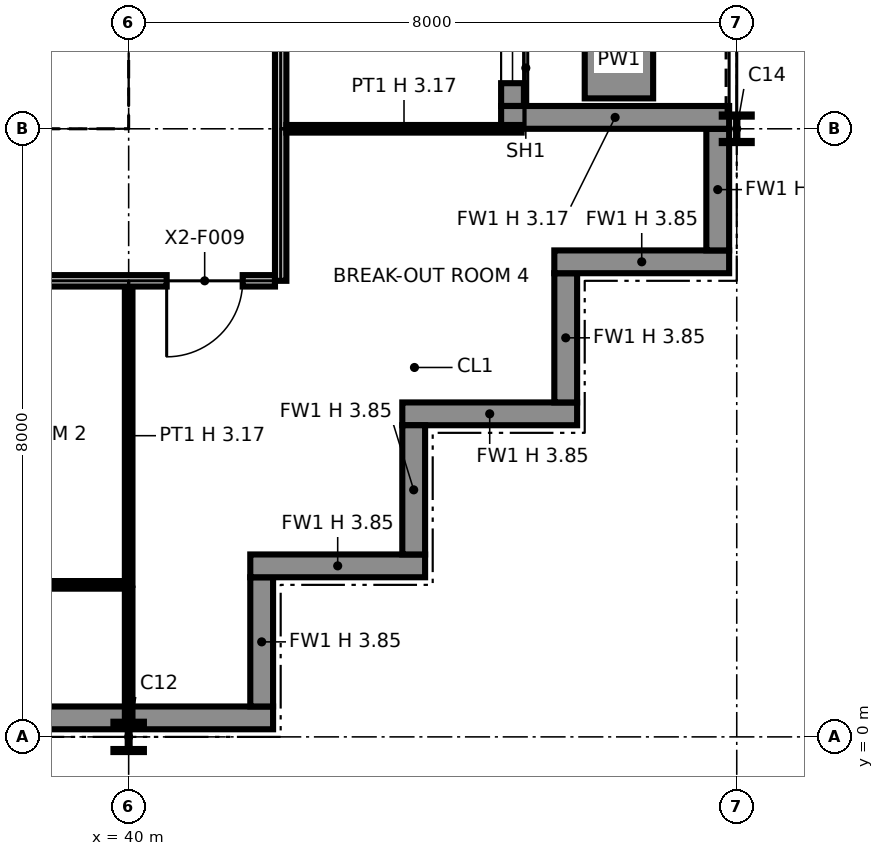
"""IFC4 building model, lengths in metres.
Left out: names, types, materials, properties, quantities, classifications, styles, units other than length and angle.
Written with IfcOpenShell. Run it as: python <this file> out.ifc"""

import sys

from ifc_helpers import new_model, si_unit, direction, frame, frame_2d, origin, origin_2d, place, context, subcontext, project, spatial, polyline, rectangle, i_section, outline, extrude, element, fill, save


model = new_model("IFC4")
c1 = context("Model", 3, precision=1e-05, world=origin(), true_north=direction((0.0, 1.0)))
c2 = subcontext(c1, "Body", "Model", "MODEL_VIEW")
j1 = project(units=[si_unit("LENGTHUNIT", "METRE"), si_unit("PLANEANGLEUNIT", "RADIAN")], contexts=[c1])
p1 = place(None, origin())
s1 = spatial("IfcSite", under=j1, at=p1, CompositionType="ELEMENT")
p2 = place(p1, origin())
s2 = spatial("IfcBuilding", under=s1, at=p2, CompositionType="ELEMENT")
p3 = place(p2, frame((0.0, 0.0, 259.0)))
s3 = spatial("IfcBuildingStorey", under=s2, at=p3, CompositionType="ELEMENT", Elevation=259.0)
p4 = place(p3, frame((40.0, 0.0, 0.0), z_axis=(0.0, 0.0, 1.0), x_axis=(1.0, 0.0, 0.0)))
e1 = element("IfcColumn", 1, at=p4, inside=s3, PredefinedType="COLUMN", context=c2, shape_type="SweptSolid", body=[
    extrude(i_section(OverallWidth=0.401, OverallDepth=0.399, WebThickness=0.025, FlangeThickness=0.04, at=origin_2d()), origin(), (0.0, 0.0, 1.0), 3.85),
])
p5 = place(p3, frame((40.0, 8.0, 0.0), z_axis=(0.0, 0.0, 1.0), x_axis=(1.0, 0.0, 0.0)))
e2 = element("IfcColumn", 2, at=p5, inside=s3, PredefinedType="COLUMN", context=c2, shape_type="SweptSolid", body=[
    extrude(i_section(OverallWidth=0.371, OverallDepth=0.361, WebThickness=0.012, FlangeThickness=0.02, at=origin_2d()), origin(), (0.0, 0.0, 1.0), 3.85),
])
p6 = place(p3, frame((48.0, 8.0, 0.0), z_axis=(0.0, 0.0, 1.0), x_axis=(1.0, 0.0, 0.0)))
e3 = element("IfcColumn", 3, at=p6, inside=s3, PredefinedType="COLUMN", context=c2, shape_type="SweptSolid", body=[
    extrude(i_section(OverallWidth=0.394, OverallDepth=0.376, WebThickness=0.017, FlangeThickness=0.028, at=origin_2d()), origin(), (0.0, 0.0, 1.0), 3.85),
])
p7 = place(p3, frame((32.0, 0.25, 0.0), z_axis=(0.0, 0.0, 1.0), x_axis=(1.0, 0.0, 0.0)))
e4 = element("IfcWall", 4, at=p7, inside=s3, PredefinedType="SOLIDWALL", context=c2, shape_type="SweptSolid", body=[
    extrude(rectangle(XDim=9.9, YDim=0.3, at=frame_2d((4.95, 0.0))), origin(), (0.0, 0.0, 1.0), 3.85),
])
p8 = place(p3, frame((41.75, 0.4, 0.0), z_axis=(0.0, 0.0, 1.0), x_axis=(0.0, 1.0, 0.0)))
e5 = element("IfcWall", 5, at=p8, inside=s3, PredefinedType="SOLIDWALL", context=c2, shape_type="SweptSolid", body=[
    extrude(rectangle(XDim=1.7, YDim=0.3, at=frame_2d((0.85, 0.0))), origin(), (0.0, 0.0, 1.0), 3.85),
])
p9 = place(p3, frame((41.6, 2.25, 0.0), z_axis=(0.0, 0.0, 1.0), x_axis=(1.0, 0.0, 0.0)))
e6 = element("IfcWall", 6, at=p9, inside=s3, PredefinedType="SOLIDWALL", context=c2, shape_type="SweptSolid", body=[
    extrude(rectangle(XDim=2.3, YDim=0.3, at=frame_2d((1.15, 0.0))), origin(), (0.0, 0.0, 1.0), 3.85),
])
p10 = place(p3, frame((43.75, 2.4, 0.0), z_axis=(0.0, 0.0, 1.0), x_axis=(0.0, 1.0, 0.0)))
e7 = element("IfcWall", 7, at=p10, inside=s3, PredefinedType="SOLIDWALL", context=c2, shape_type="SweptSolid", body=[
    extrude(rectangle(XDim=1.7, YDim=0.3, at=frame_2d((0.85, 0.0))), origin(), (0.0, 0.0, 1.0), 3.85),
])
p11 = place(p3, frame((43.6, 4.25, 0.0), z_axis=(0.0, 0.0, 1.0), x_axis=(1.0, 0.0, 0.0)))
e8 = element("IfcWall", 8, at=p11, inside=s3, PredefinedType="SOLIDWALL", context=c2, shape_type="SweptSolid", body=[
    extrude(rectangle(XDim=2.3, YDim=0.3, at=frame_2d((1.15, 0.0))), origin(), (0.0, 0.0, 1.0), 3.85),
])
p12 = place(p3, frame((45.75, 4.4, 0.0), z_axis=(0.0, 0.0, 1.0), x_axis=(0.0, 1.0, 0.0)))
e9 = element("IfcWall", 9, at=p12, inside=s3, PredefinedType="SOLIDWALL", context=c2, shape_type="SweptSolid", body=[
    extrude(rectangle(XDim=1.7, YDim=0.3, at=frame_2d((0.85, 0.0))), origin(), (0.0, 0.0, 1.0), 3.85),
])
p13 = place(p3, frame((45.6, 6.25, 0.0), z_axis=(0.0, 0.0, 1.0), x_axis=(1.0, 0.0, 0.0)))
e10 = element("IfcWall", 10, at=p13, inside=s3, PredefinedType="SOLIDWALL", context=c2, shape_type="SweptSolid", body=[
    extrude(rectangle(XDim=2.3, YDim=0.3, at=frame_2d((1.15, 0.0))), origin(), (0.0, 0.0, 1.0), 3.85),
])
p14 = place(p3, frame((47.75, 6.4, 0.0), z_axis=(0.0, 0.0, 1.0), x_axis=(0.0, 1.0, 0.0)))
e11 = element("IfcWall", 11, at=p14, inside=s3, PredefinedType="SOLIDWALL", context=c2, shape_type="SweptSolid", body=[
    extrude(rectangle(XDim=1.6, YDim=0.3, at=frame_2d((0.8, 0.0))), origin(), (0.0, 0.0, 1.0), 3.85),
])
p15 = place(p3, frame((45.05, 8.3, 0.0), z_axis=(0.0, 0.0, 1.0), x_axis=(0.0, 1.0, 0.0)))
e12 = element("IfcWall", 12, at=p15, inside=s3, PredefinedType="SOLIDWALL", context=c2, shape_type="SweptSolid", body=[
    extrude(rectangle(XDim=7.4, YDim=0.3, at=frame_2d((3.7, 0.0))), origin(), (0.0, 0.0, 1.0), 3.85),
])
p16 = place(p15, frame((0.3, 0.0, 0.9)))
e13 = element("IfcOpeningElement", 13, at=p16, cuts=e12, PredefinedType="OPENING", context=c2, shape_type="SweptSolid", body=[
    extrude(rectangle(XDim=2.8, YDim=2.2, at=frame_2d((1.4, 1.1))), frame((0.0, 0.16, 0.0), z_axis=(0.0, -1.0, 0.0), x_axis=(1.0, 0.0, 0.0)), (0.0, 0.0, 1.0), 0.32),
])
p17 = place(p15, frame((4.7, 0.0, 0.0)))
e14 = element("IfcOpeningElement", 14, at=p17, cuts=e12, PredefinedType="OPENING", context=c2, shape_type="SweptSolid", body=[
    extrude(rectangle(XDim=2.0, YDim=2.4, at=frame_2d((1.0, 1.2))), frame((0.0, 0.16, 0.0), z_axis=(0.0, -1.0, 0.0), x_axis=(1.0, 0.0, 0.0)), (0.0, 0.0, 1.0), 0.32),
])
p18 = place(p3, frame((47.9, 8.15, 0.0), z_axis=(0.0, 0.0, 1.0), x_axis=(-1.0, 0.0, 0.0)))
e15 = element("IfcWall", 15, at=p18, inside=s3, PredefinedType="SOLIDWALL", context=c2, shape_type="SweptSolid", body=[
    extrude(rectangle(XDim=3.0, YDim=0.3, at=frame_2d((1.5, 0.0))), origin(), (0.0, 0.0, 1.0), 3.171),
])
p19 = place(p3, frame((46.45, 8.4, 0.0), z_axis=(0.0, 0.0, 1.0), x_axis=(0.0, 1.0, 0.0)))
e16 = element("IfcWall", 16, at=p19, inside=s3, PredefinedType="SOLIDWALL", context=c2, shape_type="SweptSolid", body=[
    extrude(rectangle(XDim=3.2, YDim=0.9, at=frame_2d((1.6, 0.0))), origin(), (0.0, 0.0, 1.0), 0.6),
])
p20 = place(p3, frame((24.65, 8.75, 0.0), z_axis=(0.0, 0.0, 1.0), x_axis=(1.0, 0.0, 0.0)))
e17 = element("IfcWall", 17, at=p20, inside=s3, PredefinedType="PARTITIONING", context=c2, shape_type="SweptSolid", body=[
    extrude(outline(polyline([(0.0, 0.0), (14.7, 0.0), (14.7, 3.85), (7.438, 3.85), (7.438, 3.308), (7.262, 3.308), (7.261, 3.85), (0.0, 3.85), (0.0, 0.0)])), frame((0.0, 0.1, 0.0), z_axis=(0.0, -1.0, 0.0), x_axis=(1.0, 0.0, 0.0)), (0.0, 0.0, 1.0), 0.2),
])
p21 = place(p3, frame((39.25, 8.85, 0.0), z_axis=(0.0, 0.0, 1.0), x_axis=(0.0, 1.0, 0.0)))
e18 = element("IfcWall", 18, at=p21, inside=s3, PredefinedType="PARTITIONING", context=c2, shape_type="SweptSolid", body=[
    extrude(rectangle(XDim=6.3, YDim=0.2, at=frame_2d((3.15, 0.0))), origin(), (0.0, 0.0, 1.0), 3.85),
])
p22 = place(p3, frame((40.0, 0.13, 0.0), z_axis=(0.0, 0.0, 1.0), x_axis=(0.0, 1.0, 0.0)))
e19 = element("IfcWall", 19, at=p22, inside=s3, PredefinedType="PARTITIONING", context=c2, shape_type="SweptSolid", body=[
    extrude(rectangle(XDim=1.82, YDim=0.1, at=frame_2d((0.91, 0.0))), origin(), (0.0, 0.0, 1.0), 3.172),
])
p23 = place(p3, frame((32.03, 2.0, 0.0), z_axis=(0.0, 0.0, 1.0), x_axis=(1.0, 0.0, 0.0)))
e20 = element("IfcWall", 20, at=p23, inside=s3, PredefinedType="PARTITIONING", context=c2, shape_type="SweptSolid", body=[
    extrude(rectangle(XDim=7.92, YDim=0.1, at=frame_2d((3.96, 0.0))), origin(), (0.0, 0.0, 1.0), 3.85),
])
p24 = place(p23, frame((4.47, 0.0, 0.0), z_axis=(0.0, 0.0, 1.0), x_axis=(-1.0, 0.0, 0.0)))
e21 = element("IfcOpeningElement", 21, at=p24, cuts=e20, PredefinedType="OPENING", context=c2, shape_type="SweptSolid", body=[
    extrude(rectangle(XDim=1.0, YDim=2.1, at=frame_2d((0.5, 1.05))), frame((0.0, 0.06, 0.0), z_axis=(0.0, -1.0, 0.0), x_axis=(1.0, 0.0, 0.0)), (0.0, 0.0, 1.0), 0.12),
])
p25 = place(p3, frame((40.0, 2.0, 0.0), z_axis=(0.0, 0.0, 1.0), x_axis=(0.0, 1.0, 0.0)))
e22 = element("IfcWall", 22, at=p25, inside=s3, PredefinedType="PARTITIONING", context=c2, shape_type="SweptSolid", body=[
    extrude(rectangle(XDim=3.925, YDim=0.1, at=frame_2d((1.962, 0.0))), origin(), (0.0, 0.0, 1.0), 3.172),
])
p26 = place(p3, frame((6.075, 6.0, 0.0), z_axis=(0.0, 0.0, 1.0), x_axis=(1.0, 0.0, 0.0)))
e23 = element("IfcWall", 23, at=p26, inside=s3, PredefinedType="PARTITIONING", context=c2, shape_type="SweptSolid", body=[
    extrude(rectangle(XDim=35.85, YDim=0.15, at=frame_2d((17.925, 0.0))), origin(), (0.0, 0.0, 1.0), 3.85),
])
p27 = place(p26, frame((14.425, 0.0, 0.0), z_axis=(0.0, 0.0, 1.0), x_axis=(-1.0, 0.0, 0.0)))
e24 = element("IfcOpeningElement", 24, at=p27, cuts=e23, PredefinedType="OPENING", context=c2, shape_type="SweptSolid", body=[
    extrude(rectangle(XDim=1.0, YDim=2.1, at=frame_2d((0.5, 1.05))), frame((0.0, 0.085, 0.0), z_axis=(0.0, -1.0, 0.0), x_axis=(1.0, 0.0, 0.0)), (0.0, 0.0, 1.0), 0.17),
])
p28 = place(p26, frame((30.425, 0.0, 0.0), z_axis=(0.0, 0.0, 1.0), x_axis=(-1.0, 0.0, 0.0)))
e25 = element("IfcOpeningElement", 25, at=p28, cuts=e23, PredefinedType="OPENING", context=c2, shape_type="SweptSolid", body=[
    extrude(rectangle(XDim=1.0, YDim=2.1, at=frame_2d((0.5, 1.05))), frame((0.0, 0.085, 0.0), z_axis=(0.0, -1.0, 0.0), x_axis=(1.0, 0.0, 0.0)), (0.0, 0.0, 1.0), 0.17),
])
p29 = place(p26, frame((4.425, 0.0, 0.0), z_axis=(0.0, 0.0, 1.0), x_axis=(-1.0, 0.0, 0.0)))
e26 = element("IfcOpeningElement", 26, at=p29, cuts=e23, PredefinedType="OPENING", context=c2, shape_type="SweptSolid", body=[
    extrude(rectangle(XDim=1.0, YDim=2.1, at=frame_2d((0.5, 1.05))), frame((0.0, 0.085, 0.0), z_axis=(0.0, -1.0, 0.0), x_axis=(1.0, 0.0, 0.0)), (0.0, 0.0, 1.0), 0.17),
])
p30 = place(p26, frame((8.425, 0.0, 0.0), z_axis=(0.0, 0.0, 1.0), x_axis=(-1.0, 0.0, 0.0)))
e27 = element("IfcOpeningElement", 27, at=p30, cuts=e23, PredefinedType="OPENING", context=c2, shape_type="SweptSolid", body=[
    extrude(rectangle(XDim=1.0, YDim=2.1, at=frame_2d((0.5, 1.05))), frame((0.0, 0.085, 0.0), z_axis=(0.0, -1.0, 0.0), x_axis=(1.0, 0.0, 0.0)), (0.0, 0.0, 1.0), 0.17),
])
p31 = place(p26, frame((23.425, 0.0, 0.0), z_axis=(0.0, 0.0, 1.0), x_axis=(-1.0, 0.0, 0.0)))
e28 = element("IfcOpeningElement", 28, at=p31, cuts=e23, PredefinedType="OPENING", context=c2, shape_type="SweptSolid", body=[
    extrude(rectangle(XDim=1.0, YDim=2.1, at=frame_2d((0.5, 1.05))), frame((0.0, 0.085, 0.0), z_axis=(0.0, -1.0, 0.0), x_axis=(1.0, 0.0, 0.0)), (0.0, 0.0, 1.0), 0.17),
])
p32 = place(p26, frame((35.425, 0.0, 0.0), z_axis=(0.0, 0.0, 1.0), x_axis=(-1.0, 0.0, 0.0)))
e29 = element("IfcOpeningElement", 29, at=p32, cuts=e23, PredefinedType="OPENING", context=c2, shape_type="SweptSolid", body=[
    extrude(rectangle(XDim=1.0, YDim=2.1, at=frame_2d((0.5, 1.05))), frame((0.0, 0.085, 0.0), z_axis=(0.0, -1.0, 0.0), x_axis=(1.0, 0.0, 0.0)), (0.0, 0.0, 1.0), 0.17),
])
p33 = place(p3, frame((42.0, 6.0, 0.0), z_axis=(0.0, 0.0, 1.0), x_axis=(0.0, 1.0, 0.0)))
e30 = element("IfcWall", 30, at=p33, inside=s3, PredefinedType="PARTITIONING", context=c2, shape_type="SweptSolid", body=[
    extrude(outline(polyline([(0.0, 0.0), (11.925, 0.0), (11.925, 3.85), (10.3, 3.85), (10.298, 3.172), (9.702, 3.172), (9.7, 3.85), (6.3, 3.85), (6.298, 3.172), (5.702, 3.172), (5.7, 3.85), (2.3, 3.85), (2.298, 3.172), (1.702, 3.172), (1.7, 3.85), (0.0, 3.85), (0.0, 0.0)])), frame((0.0, 0.075, 0.0), z_axis=(0.0, -1.0, 0.0), x_axis=(1.0, 0.0, 0.0)), (0.0, 0.0, 1.0), 0.15),
])
p34 = place(p33, frame((6.5, 0.0, 0.0), z_axis=(0.0, 0.0, 1.0), x_axis=(-1.0, 0.0, 0.0)))
e31 = element("IfcOpeningElement", 31, at=p34, cuts=e30, PredefinedType="OPENING", context=c2, shape_type="SweptSolid", body=[
    extrude(rectangle(XDim=1.0, YDim=2.1, at=frame_2d((0.5, 1.05))), frame((0.0, 0.085, 0.0), z_axis=(0.0, -1.0, 0.0), x_axis=(1.0, 0.0, 0.0)), (0.0, 0.0, 1.0), 0.17),
])
p35 = place(p33, frame((11.5, 0.0, 0.0), z_axis=(0.0, 0.0, 1.0), x_axis=(-1.0, 0.0, 0.0)))
e32 = element("IfcOpeningElement", 32, at=p35, cuts=e30, PredefinedType="OPENING", context=c2, shape_type="SweptSolid", body=[
    extrude(rectangle(XDim=1.0, YDim=2.1, at=frame_2d((0.5, 1.05))), frame((0.0, 0.085, 0.0), z_axis=(0.0, -1.0, 0.0), x_axis=(1.0, 0.0, 0.0)), (0.0, 0.0, 1.0), 0.17),
])
p36 = place(p3, frame((42.075, 8.0, 0.0), z_axis=(0.0, 0.0, 1.0), x_axis=(1.0, 0.0, 0.0)))
e33 = element("IfcWall", 33, at=p36, inside=s3, PredefinedType="PARTITIONING", context=c2, shape_type="SweptSolid", body=[
    extrude(rectangle(XDim=3.095, YDim=0.1, at=frame_2d((1.547, 0.0))), origin(), (0.0, 0.0, 1.0), 3.172),
])
p37 = place(p16, origin())
e34 = element("IfcWindow", 34, at=p37, inside=s3, PartitioningType="SINGLE_PANEL", PredefinedType="WINDOW", context=c2, shape_type="SweptSolid", body=[
    extrude(rectangle(XDim=2.8, YDim=2.2, at=frame_2d((1.4, 1.1))), frame((0.0, 0.03, 0.0), z_axis=(0.0, -1.0, 0.0), x_axis=(1.0, 0.0, 0.0)), (0.0, 0.0, 1.0), 0.06),
])
fill(e13, e34)
p38 = place(p32, origin())
e35 = element("IfcDoor", 35, at=p38, inside=s3, OperationType="SINGLE_SWING_RIGHT", PredefinedType="DOOR", context=c2, shape_type="SweptSolid", body=[
    extrude(rectangle(XDim=1.0, YDim=2.1, at=frame_2d((0.5, 1.05))), frame((0.0, 0.025, 0.0), z_axis=(0.0, -1.0, 0.0), x_axis=(1.0, 0.0, 0.0)), (0.0, 0.0, 1.0), 0.05),
])
fill(e29, e35)
save(model, sys.argv[1])
